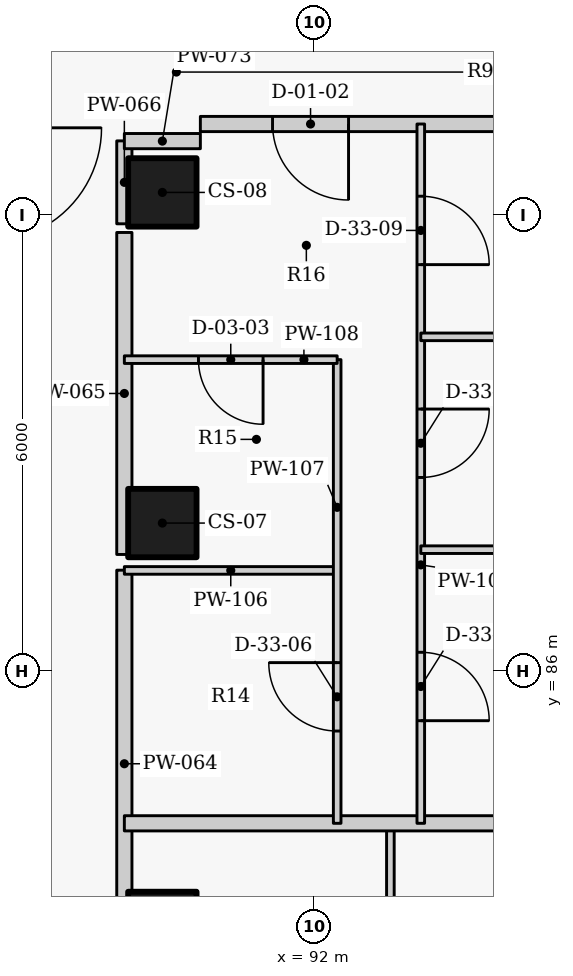
"""IFC4 building model, lengths in metres.
Left out: names, types, materials, properties, quantities, classifications, styles, units other than length and angle.
Written with IfcOpenShell. Run it as: python <this file> out.ifc"""

import sys

from ifc_helpers import new_model, si_unit, direction, frame, frame_2d, origin, origin_2d, place, context, subcontext, project, spatial, rectangle, extrude, element, fill, save


model = new_model("IFC4")
c1 = context("Model", 3, precision=1e-05, world=origin(), true_north=direction((0.0, 1.0)))
c2 = subcontext(c1, "Body", "Model", "MODEL_VIEW")
j1 = project(units=[si_unit("LENGTHUNIT", "METRE"), si_unit("PLANEANGLEUNIT", "RADIAN")], contexts=[c1])
p1 = place(None, origin())
s1 = spatial("IfcSite", under=j1, at=p1, CompositionType="ELEMENT")
p2 = place(p1, origin())
s2 = spatial("IfcBuilding", under=s1, at=p2, CompositionType="ELEMENT")
p3 = place(p2, frame((0.0, 0.0, 249.3)))
s3 = spatial("IfcBuildingStorey", under=s2, at=p3, CompositionType="ELEMENT", Elevation=249.3)
for number, where, z_axis, x_axis in (
    (1, (90.0, 82.65, 0.0), (0.0, 0.0, 1.0), (0.0, 1.0, 0.0)),
    (2, (90.0, 87.95, 0.0), (0.0, 0.0, 1.0), (0.0, 1.0, 0.0)),
    (3, (90.0, 92.3, 0.0), (0.0, 0.0, 1.0), (0.0, 1.0, 0.0)),
):
    element("IfcColumn", number, at=place(p3, frame(where, z_axis=z_axis, x_axis=x_axis)), inside=s3, PredefinedType="COLUMN", context=c2, shape_type="SweptSolid", body=[
        extrude(rectangle(XDim=0.9, YDim=0.9, at=origin_2d()), origin(), (0.0, 0.0, 1.0), 3.3),
    ])
p4 = place(p3, frame((89.5, 82.237, 0.0), z_axis=(0.0, 0.0, 1.0), x_axis=(0.0, 1.0, 0.0)))
e4 = element("IfcWall", 4, at=p4, inside=s3, PredefinedType="PARTITIONING", context=c2, shape_type="SweptSolid", body=[
    extrude(rectangle(XDim=5.093, YDim=0.2, at=frame_2d((2.547, 0.0))), origin(), (0.0, 0.0, 1.0), 3.025),
])
p5 = place(p3, frame((89.5, 87.537, 0.0), z_axis=(0.0, 0.0, 1.0), x_axis=(0.0, 1.0, 0.0)))
e5 = element("IfcWall", 5, at=p5, inside=s3, PredefinedType="PARTITIONING", context=c2, shape_type="SweptSolid", body=[
    extrude(rectangle(XDim=4.236, YDim=0.2, at=frame_2d((2.118, 0.0))), origin(), (0.0, 0.0, 1.0), 3.025),
])
p6 = place(p3, frame((89.5, 91.887, 0.0), z_axis=(0.0, 0.0, 1.0), x_axis=(0.0, 1.0, 0.0)))
e6 = element("IfcWall", 6, at=p6, inside=s3, PredefinedType="PARTITIONING", context=c2, shape_type="SweptSolid", body=[
    extrude(rectangle(XDim=1.091, YDim=0.2, at=frame_2d((0.545, 0.0))), origin(), (0.0, 0.0, 1.0), 3.025),
])
p7 = place(p3, frame((98.187, 93.2, 0.0), z_axis=(0.0, 0.0, 1.0), x_axis=(-1.0, 0.0, 0.0)))
e7 = element("IfcWall", 7, at=p7, inside=s3, PredefinedType="PARTITIONING", context=c2, shape_type="SweptSolid", body=[
    extrude(rectangle(XDim=7.687, YDim=0.2, at=frame_2d((3.843, 0.0))), origin(), (0.0, 0.0, 1.0), 2.405),
])
p8 = place(p7, frame((5.737, 0.0, 0.0)))
e8 = element("IfcOpeningElement", 8, at=p8, cuts=e7, PredefinedType="OPENING", context=c2, shape_type="SweptSolid", body=[
    extrude(rectangle(XDim=1.0, YDim=2.1, at=frame_2d((0.5, 1.05))), frame((0.0, 0.11, 0.0), z_axis=(0.0, -1.0, 0.0), x_axis=(1.0, 0.0, 0.0)), (0.0, 0.0, 1.0), 0.22),
])
p9 = place(p3, frame((89.5, 92.975, 0.0), z_axis=(0.0, 0.0, 1.0), x_axis=(1.0, 0.0, 0.0)))
e9 = element("IfcWall", 9, at=p9, inside=s3, PredefinedType="PARTITIONING", context=c2, shape_type="SweptSolid", body=[
    extrude(rectangle(XDim=1.0, YDim=0.2, at=frame_2d((0.5, 0.0))), origin(), (0.0, 0.0, 1.0), 2.505),
])
p10 = place(p3, frame((93.0, 84.0, 0.0), z_axis=(0.0, 0.0, 1.0), x_axis=(0.0, -1.0, 0.0)))
e10 = element("IfcWall", 10, at=p10, inside=s3, PredefinedType="PARTITIONING", context=c2, shape_type="SweptSolid", body=[
    extrude(rectangle(XDim=14.5, YDim=0.1, at=frame_2d((7.25, 0.0))), origin(), (0.0, 0.0, 1.0), 3.025),
])
p11 = place(p10, frame((12.459, 0.0, 0.0)))
e11 = element("IfcOpeningElement", 11, at=p11, cuts=e10, PredefinedType="OPENING", context=c2, shape_type="SweptSolid", body=[
    extrude(rectangle(XDim=0.9, YDim=2.1, at=frame_2d((0.45, 1.05))), frame((0.0, 0.06, 0.0), z_axis=(0.0, -1.0, 0.0), x_axis=(1.0, 0.0, 0.0)), (0.0, 0.0, 1.0), 0.12),
])
p12 = place(p10, frame((8.391, 0.0, 0.0)))
e12 = element("IfcOpeningElement", 12, at=p12, cuts=e10, PredefinedType="OPENING", context=c2, shape_type="SweptSolid", body=[
    extrude(rectangle(XDim=0.9, YDim=2.1, at=frame_2d((0.45, 1.05))), frame((0.0, 0.06, 0.0), z_axis=(0.0, -1.0, 0.0), x_axis=(1.0, 0.0, 0.0)), (0.0, 0.0, 1.0), 0.12),
])
p13 = place(p10, frame((4.324, 0.0, 0.0)))
e13 = element("IfcOpeningElement", 13, at=p13, cuts=e10, PredefinedType="OPENING", context=c2, shape_type="SweptSolid", body=[
    extrude(rectangle(XDim=0.9, YDim=2.1, at=frame_2d((0.45, 1.05))), frame((0.0, 0.06, 0.0), z_axis=(0.0, -1.0, 0.0), x_axis=(1.0, 0.0, 0.0)), (0.0, 0.0, 1.0), 0.12),
])
p14 = place(p10, frame((1.141, 0.0, 0.0)))
e14 = element("IfcOpeningElement", 14, at=p14, cuts=e10, PredefinedType="OPENING", context=c2, shape_type="SweptSolid", body=[
    extrude(rectangle(XDim=0.9, YDim=2.1, at=frame_2d((0.45, 1.05))), frame((0.0, 0.06, 0.0), z_axis=(0.0, -1.0, 0.0), x_axis=(1.0, 0.0, 0.0)), (0.0, 0.0, 1.0), 0.12),
])
p15 = place(p3, frame((89.5, 84.0, 0.0), z_axis=(0.0, 0.0, 1.0), x_axis=(1.0, 0.0, 0.0)))
e15 = element("IfcWall", 15, at=p15, inside=s3, PredefinedType="PARTITIONING", context=c2, shape_type="SweptSolid", body=[
    extrude(rectangle(XDim=13.998, YDim=0.2, at=frame_2d((6.999, 0.0))), origin(), (0.0, 0.0, 1.0), 2.405),
])
p16 = place(p3, frame((89.5, 87.327, 0.0), z_axis=(0.0, 0.0, 1.0), x_axis=(1.0, 0.0, 0.0)))
e16 = element("IfcWall", 16, at=p16, inside=s3, PredefinedType="PARTITIONING", context=c2, shape_type="SweptSolid", body=[
    extrude(rectangle(XDim=2.8, YDim=0.1, at=frame_2d((1.4, 0.0))), origin(), (0.0, 0.0, 1.0), 2.505),
])
p17 = place(p3, frame((92.3, 84.0, 0.0), z_axis=(0.0, 0.0, 1.0), x_axis=(0.0, 1.0, 0.0)))
e17 = element("IfcWall", 17, at=p17, inside=s3, PredefinedType="PARTITIONING", context=c2, shape_type="SweptSolid", body=[
    extrude(rectangle(XDim=6.1, YDim=0.1, at=frame_2d((3.05, 0.0))), origin(), (0.0, 0.0, 1.0), 3.025),
])
p18 = place(p17, frame((1.214, 0.0, 0.0)))
e18 = element("IfcOpeningElement", 18, at=p18, cuts=e17, PredefinedType="OPENING", context=c2, shape_type="SweptSolid", body=[
    extrude(rectangle(XDim=0.9, YDim=2.1, at=frame_2d((0.45, 1.05))), frame((0.0, 0.06, 0.0), z_axis=(0.0, -1.0, 0.0), x_axis=(1.0, 0.0, 0.0)), (0.0, 0.0, 1.0), 0.12),
])
p19 = place(p3, frame((92.3, 90.1, 0.0), z_axis=(0.0, 0.0, 1.0), x_axis=(-1.0, 0.0, 0.0)))
e19 = element("IfcWall", 19, at=p19, inside=s3, PredefinedType="PARTITIONING", context=c2, shape_type="SweptSolid", body=[
    extrude(rectangle(XDim=2.8, YDim=0.1, at=frame_2d((1.4, 0.0))), origin(), (0.0, 0.0, 1.0), 2.505),
])
p20 = place(p19, frame((0.975, 0.0, 0.0)))
e20 = element("IfcOpeningElement", 20, at=p20, cuts=e19, PredefinedType="OPENING", context=c2, shape_type="SweptSolid", body=[
    extrude(rectangle(XDim=0.85, YDim=2.1, at=frame_2d((0.425, 1.05))), frame((0.0, 0.06, 0.0), z_axis=(0.0, -1.0, 0.0), x_axis=(1.0, 0.0, 0.0)), (0.0, 0.0, 1.0), 0.12),
])
p21 = place(p3, frame((93.4, 93.2, 0.0), z_axis=(0.0, 0.0, 1.0), x_axis=(0.0, -1.0, 0.0)))
e21 = element("IfcWall", 21, at=p21, inside=s3, PredefinedType="PARTITIONING", context=c2, shape_type="SweptSolid", body=[
    extrude(rectangle(XDim=9.2, YDim=0.1, at=frame_2d((4.6, 0.0))), origin(), (0.0, 0.0, 1.0), 3.025),
])
p22 = place(p21, frame((6.95, 0.0, 0.0)))
e22 = element("IfcOpeningElement", 22, at=p22, cuts=e21, PredefinedType="OPENING", context=c2, shape_type="SweptSolid", body=[
    extrude(rectangle(XDim=0.9, YDim=2.1, at=frame_2d((0.45, 1.05))), frame((0.0, 0.06, 0.0), z_axis=(0.0, -1.0, 0.0), x_axis=(1.0, 0.0, 0.0)), (0.0, 0.0, 1.0), 0.12),
])
p23 = place(p21, frame((3.75, 0.0, 0.0)))
e23 = element("IfcOpeningElement", 23, at=p23, cuts=e21, PredefinedType="OPENING", context=c2, shape_type="SweptSolid", body=[
    extrude(rectangle(XDim=0.9, YDim=2.1, at=frame_2d((0.45, 1.05))), frame((0.0, 0.06, 0.0), z_axis=(0.0, -1.0, 0.0), x_axis=(1.0, 0.0, 0.0)), (0.0, 0.0, 1.0), 0.12),
])
p24 = place(p21, frame((0.95, 0.0, 0.0)))
e24 = element("IfcOpeningElement", 24, at=p24, cuts=e21, PredefinedType="OPENING", context=c2, shape_type="SweptSolid", body=[
    extrude(rectangle(XDim=0.9, YDim=2.1, at=frame_2d((0.45, 1.05))), frame((0.0, 0.06, 0.0), z_axis=(0.0, -1.0, 0.0), x_axis=(1.0, 0.0, 0.0)), (0.0, 0.0, 1.0), 0.12),
])
p25 = place(p3, frame((93.4, 87.6, 0.0), z_axis=(0.0, 0.0, 1.0), x_axis=(1.0, 0.0, 0.0)))
e25 = element("IfcWall", 25, at=p25, inside=s3, PredefinedType="PARTITIONING", context=c2, shape_type="SweptSolid", body=[
    extrude(rectangle(XDim=7.556, YDim=0.1, at=frame_2d((3.778, 0.0))), origin(), (0.0, 0.0, 1.0), 3.025),
])
p26 = place(p3, frame((93.4, 90.4, 0.0), z_axis=(0.0, 0.0, 1.0), x_axis=(1.0, 0.0, 0.0)))
e26 = element("IfcWall", 26, at=p26, inside=s3, PredefinedType="PARTITIONING", context=c2, shape_type="SweptSolid", body=[
    extrude(rectangle(XDim=6.403, YDim=0.1, at=frame_2d((3.202, 0.0))), origin(), (0.0, 0.0, 1.0), 2.405),
])
p27 = place(p8, origin())
e27 = element("IfcDoor", 27, at=p27, inside=s3, OperationType="SINGLE_SWING_LEFT", PredefinedType="DOOR", context=c2, shape_type="SweptSolid", body=[
    extrude(rectangle(XDim=1.0, YDim=2.1, at=frame_2d((0.5, 1.05))), frame((0.0, 0.025, 0.0), z_axis=(0.0, -1.0, 0.0), x_axis=(1.0, 0.0, 0.0)), (0.0, 0.0, 1.0), 0.05),
])
fill(e8, e27)
p28 = place(p18, origin())
e28 = element("IfcDoor", 28, at=p28, inside=s3, OperationType="SINGLE_SWING_RIGHT", PredefinedType="DOOR", context=c2, shape_type="SweptSolid", body=[
    extrude(rectangle(XDim=0.9, YDim=2.1, at=frame_2d((0.45, 1.05))), frame((0.0, 0.025, 0.0), z_axis=(0.0, -1.0, 0.0), x_axis=(1.0, 0.0, 0.0)), (0.0, 0.0, 1.0), 0.05),
])
fill(e18, e28)
p29 = place(p20, origin())
e29 = element("IfcDoor", 29, at=p29, inside=s3, OperationType="SINGLE_SWING_LEFT", PredefinedType="DOOR", context=c2, shape_type="SweptSolid", body=[
    extrude(rectangle(XDim=0.85, YDim=2.1, at=frame_2d((0.425, 1.05))), frame((0.0, 0.025, 0.0), z_axis=(0.0, -1.0, 0.0), x_axis=(1.0, 0.0, 0.0)), (0.0, 0.0, 1.0), 0.05),
])
fill(e20, e29)
p30 = place(p22, origin())
e30 = element("IfcDoor", 30, at=p30, inside=s3, OperationType="SINGLE_SWING_RIGHT", PredefinedType="DOOR", context=c2, shape_type="SweptSolid", body=[
    extrude(rectangle(XDim=0.9, YDim=2.1, at=frame_2d((0.45, 1.05))), frame((0.0, 0.025, 0.0), z_axis=(0.0, -1.0, 0.0), x_axis=(1.0, 0.0, 0.0)), (0.0, 0.0, 1.0), 0.05),
])
fill(e22, e30)
p31 = place(p23, origin())
e31 = element("IfcDoor", 31, at=p31, inside=s3, OperationType="SINGLE_SWING_LEFT", PredefinedType="DOOR", context=c2, shape_type="SweptSolid", body=[
    extrude(rectangle(XDim=0.9, YDim=2.1, at=frame_2d((0.45, 1.05))), frame((0.0, 0.025, 0.0), z_axis=(0.0, -1.0, 0.0), x_axis=(1.0, 0.0, 0.0)), (0.0, 0.0, 1.0), 0.05),
])
fill(e23, e31)
p32 = place(p24, origin())
e32 = element("IfcDoor", 32, at=p32, inside=s3, OperationType="SINGLE_SWING_RIGHT", PredefinedType="DOOR", context=c2, shape_type="SweptSolid", body=[
    extrude(rectangle(XDim=0.9, YDim=2.1, at=frame_2d((0.45, 1.05))), frame((0.0, 0.025, 0.0), z_axis=(0.0, -1.0, 0.0), x_axis=(1.0, 0.0, 0.0)), (0.0, 0.0, 1.0), 0.05),
])
fill(e24, e32)
save(model, sys.argv[1])
